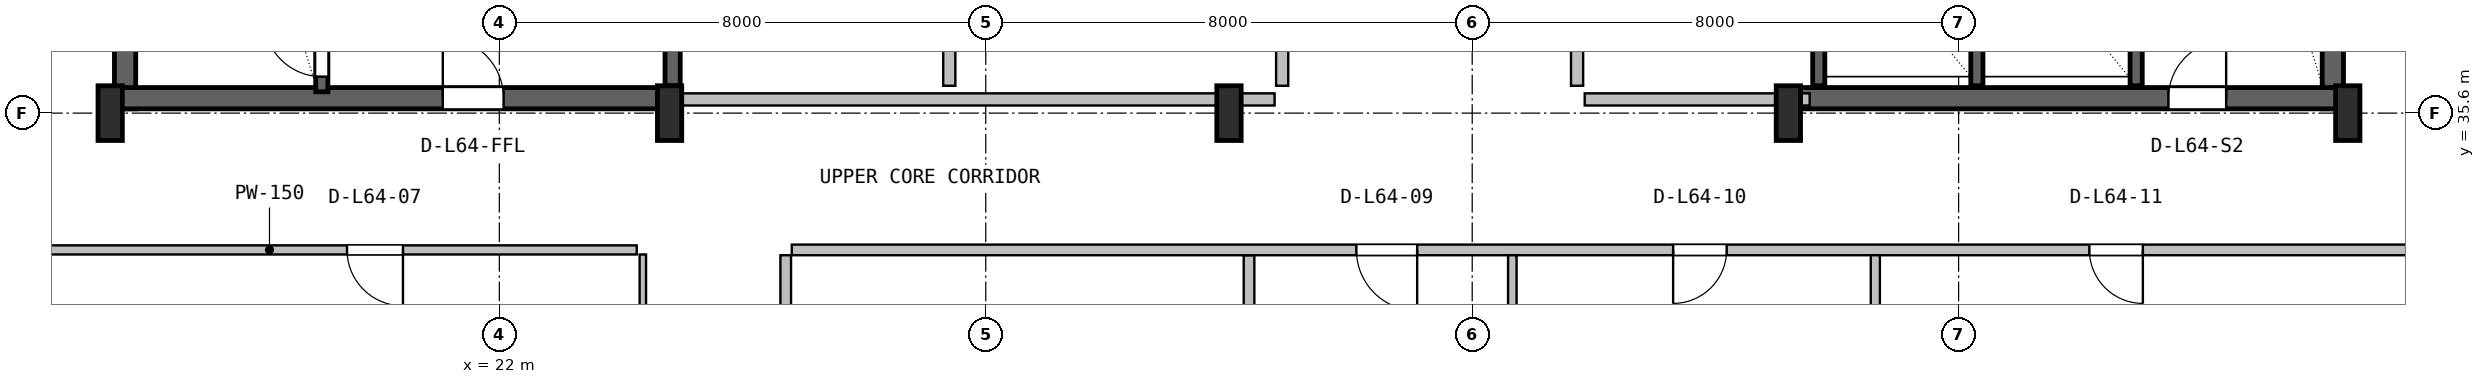
"""IFC4 building model, lengths in metres.
Left out: names, types, materials, properties, quantities, classifications, styles, units other than length and angle.
Written with IfcOpenShell. Run it as: python <this file> out.ifc"""

import sys

from ifc_helpers import new_model, si_unit, direction, frame, frame_2d, origin, origin_2d, place, context, subcontext, project, spatial, rectangle, i_section, extrude, source, transform, mapped, element, fill, save


model = new_model("IFC4")
c1 = context("Model", 3, precision=1e-05, world=origin(), true_north=direction((0.0, 1.0)))
c2 = subcontext(c1, "Body", "Model", "MODEL_VIEW")
j1 = project(units=[si_unit("LENGTHUNIT", "METRE"), si_unit("PLANEANGLEUNIT", "RADIAN")], contexts=[c1])
p1 = place(None, origin())
s1 = spatial("IfcSite", under=j1, at=p1, CompositionType="ELEMENT")
p2 = place(p1, origin())
s2 = spatial("IfcBuilding", under=s1, at=p2, CompositionType="ELEMENT")
p3 = place(p2, frame((0.0, 0.0, 258.4)))
s3 = spatial("IfcBuildingStorey", under=s2, at=p3, CompositionType="ELEMENT", Elevation=258.4)
for number, where, z_axis, x_axis in (
    (1, (15.845, 35.67, 0.0), (0.0, 0.0, 1.0), (0.0, 1.0, 0.0)),
    (2, (52.155, 35.67, 0.0), (0.0, 0.0, 1.0), (0.0, 1.0, 0.0)),
):
    element("IfcWall", number, at=place(p3, frame(where, z_axis=z_axis, x_axis=x_axis)), inside=s3, PredefinedType="SHEAR", context=c2, shape_type="SweptSolid", body=[
        extrude(rectangle(XDim=11.13, YDim=0.35, at=frame_2d((5.565, 0.0))), origin(), (0.0, 0.0, 1.0), 3.55),
    ])
p4 = place(p3, frame((15.67, 35.845, 0.0), z_axis=(0.0, 0.0, 1.0), x_axis=(1.0, 0.0, 0.0)))
e3 = element("IfcWall", 3, at=p4, inside=s3, PredefinedType="SHEAR", context=c2, shape_type="SweptSolid", body=[
    extrude(rectangle(XDim=9.13, YDim=0.35, at=frame_2d((4.565, 0.0))), origin(), (0.0, 0.0, 1.0), 3.55),
])
p5 = place(p4, frame((5.4, 0.0, 0.0)))
e4 = element("IfcOpeningElement", 4, at=p5, cuts=e3, PredefinedType="OPENING", context=c2, shape_type="SweptSolid", body=[
    extrude(rectangle(XDim=1.0, YDim=2.1, at=frame_2d((0.5, 1.05))), frame((0.0, 0.185, 0.0), z_axis=(0.0, -1.0, 0.0), x_axis=(1.0, 0.0, 0.0)), (0.0, 0.0, 1.0), 0.37),
])
p6 = place(p3, frame((43.2, 35.845, 0.0), z_axis=(0.0, 0.0, 1.0), x_axis=(1.0, 0.0, 0.0)))
e5 = element("IfcWall", 5, at=p6, inside=s3, PredefinedType="SHEAR", context=c2, shape_type="SweptSolid", body=[
    extrude(rectangle(XDim=9.13, YDim=0.35, at=frame_2d((4.565, 0.0))), origin(), (0.0, 0.0, 1.0), 3.55),
])
p7 = place(p6, frame((6.25, 0.0, 0.0)))
e6 = element("IfcOpeningElement", 6, at=p7, cuts=e5, PredefinedType="OPENING", context=c2, shape_type="SweptSolid", body=[
    extrude(rectangle(XDim=0.95, YDim=2.1, at=frame_2d((0.475, 1.05))), frame((0.0, 0.185, 0.0), z_axis=(0.0, -1.0, 0.0), x_axis=(1.0, 0.0, 0.0)), (0.0, 0.0, 1.0), 0.37),
])
m1 = source(origin(), c2, "Body", "SweptSolid", [
    extrude(i_section(OverallWidth=0.4, OverallDepth=0.9, WebThickness=0.016, FlangeThickness=0.028, FilletRadius=0.016, at=origin_2d()), origin(), (0.0, 0.0, 1.0), 3.8),
])
for number, where, z_axis, x_axis in (
    (7, (15.6, 35.6, 0.0), (0.0, 0.0, 1.0), (1.0, 0.0, 0.0)),
    (8, (24.8, 35.6, 0.0), (0.0, 0.0, 1.0), (1.0, 0.0, 0.0)),
    (9, (34.0, 35.6, 0.0), (0.0, 0.0, 1.0), (1.0, 0.0, 0.0)),
    (10, (43.2, 35.6, 0.0), (0.0, 0.0, 1.0), (1.0, 0.0, 0.0)),
    (11, (52.4, 35.6, 0.0), (0.0, 0.0, 1.0), (1.0, 0.0, 0.0)),
):
    element("IfcColumn", number, at=place(p3, frame(where, z_axis=z_axis, x_axis=x_axis)), inside=s3, PredefinedType="COLUMN", context=c2, shape_type="MappedRepresentation", body=[
        mapped(m1, transform((0.0, 0.0, 0.0), x_axis=(1.0, 0.0, 0.0), y_axis=(0.0, 1.0, 0.0), z_axis=(0.0, 0.0, 1.0), scale=1.0)),
    ])
p8 = place(p3, frame((19.08, 35.95, 0.0), z_axis=(0.0, 0.0, 1.0), x_axis=(0.0, 1.0, 0.0)))
e12 = element("IfcWall", 12, at=p8, inside=s3, PredefinedType="SHEAR", context=c2, shape_type="SweptSolid", body=[
    extrude(rectangle(XDim=9.65, YDim=0.2, at=frame_2d((4.825, 0.0))), origin(), (0.0, 0.0, 1.0), 3.55),
])
p9 = place(p8, frame((0.25, 0.0, 0.0)))
e13 = element("IfcOpeningElement", 13, at=p9, cuts=e12, PredefinedType="OPENING", context=c2, shape_type="SweptSolid", body=[
    extrude(rectangle(XDim=0.95, YDim=2.1, at=frame_2d((0.475, 1.05))), frame((0.0, 0.11, 0.0), z_axis=(0.0, -1.0, 0.0), x_axis=(1.0, 0.0, 0.0)), (0.0, 0.0, 1.0), 0.22),
])
p10 = place(p3, frame((24.85, 36.05, 0.0), z_axis=(0.0, 0.0, 1.0), x_axis=(0.0, 1.0, 0.0)))
e14 = element("IfcWall", 14, at=p10, inside=s3, PredefinedType="SHEAR", context=c2, shape_type="SweptSolid", body=[
    extrude(rectangle(XDim=10.45, YDim=0.25, at=frame_2d((5.225, 0.0))), origin(), (0.0, 0.0, 1.0), 3.55),
])
p11 = place(p3, frame((48.92, 36.05, 0.0), z_axis=(0.0, 0.0, 1.0), x_axis=(0.0, 1.0, 0.0)))
e15 = element("IfcWall", 15, at=p11, inside=s3, PredefinedType="SHEAR", context=c2, shape_type="SweptSolid", body=[
    extrude(rectangle(XDim=10.5, YDim=0.2, at=frame_2d((5.25, 0.0))), origin(), (0.0, 0.0, 1.0), 3.55),
])
for number, where, z_axis, x_axis in (
    (16, (43.7, 36.05, 0.0), (0.0, 0.0, 1.0), (0.0, 1.0, 0.0)),
    (17, (46.3, 36.05, 0.0), (0.0, 0.0, 1.0), (0.0, 1.0, 0.0)),
):
    element("IfcWall", number, at=place(p3, frame(where, z_axis=z_axis, x_axis=x_axis)), inside=s3, PredefinedType="SHEAR", context=c2, shape_type="SweptSolid", body=[
        extrude(rectangle(XDim=3.05, YDim=0.2, at=frame_2d((1.525, 0.0))), origin(), (0.0, 0.0, 1.0), 3.55),
    ])
p12 = place(p3, frame((25.0, 35.825, 0.0), z_axis=(0.0, 0.0, 1.0), x_axis=(1.0, 0.0, 0.0)))
e18 = element("IfcWall", 18, at=p12, inside=s3, PredefinedType="PLUMBINGWALL", context=c2, shape_type="SweptSolid", body=[
    extrude(rectangle(XDim=9.75, YDim=0.2, at=frame_2d((4.875, 0.0))), origin(), (0.0, 0.0, 1.0), 2.575),
])
for number, where, z_axis, x_axis in (
    (19, (29.4, 36.05, 0.0), (0.0, 0.0, 1.0), (0.0, 1.0, 0.0)),
    (20, (34.875, 36.05, 0.0), (0.0, 0.0, 1.0), (0.0, 1.0, 0.0)),
):
    element("IfcWall", number, at=place(p3, frame(where, z_axis=z_axis, x_axis=x_axis)), inside=s3, PredefinedType="PLUMBINGWALL", context=c2, shape_type="SweptSolid", body=[
        extrude(rectangle(XDim=3.1, YDim=0.2, at=frame_2d((1.55, 0.0))), origin(), (0.0, 0.0, 1.0), 3.53),
    ])
p13 = place(p3, frame((39.85, 35.825, 0.0), z_axis=(0.0, 0.0, 1.0), x_axis=(1.0, 0.0, 0.0)))
e21 = element("IfcWall", 21, at=p13, inside=s3, PredefinedType="SOLIDWALL", context=c2, shape_type="SweptSolid", body=[
    extrude(rectangle(XDim=3.7, YDim=0.2, at=frame_2d((1.85, 0.0))), origin(), (0.0, 0.0, 1.0), 2.575),
])
p14 = place(p3, frame((39.725, 36.05, 0.0), z_axis=(0.0, 0.0, 1.0), x_axis=(0.0, 1.0, 0.0)))
e22 = element("IfcWall", 22, at=p14, inside=s3, PredefinedType="SOLIDWALL", context=c2, shape_type="SweptSolid", body=[
    extrude(rectangle(XDim=3.1, YDim=0.2, at=frame_2d((1.55, 0.0))), origin(), (0.0, 0.0, 1.0), 3.53),
])
p15 = place(p3, frame((24.36, 23.162, 0.0), z_axis=(0.0, 0.0, 1.0), x_axis=(0.0, 1.0, 0.0)))
e23 = element("IfcWall", 23, at=p15, inside=s3, PredefinedType="PARTITIONING", context=c2, shape_type="SweptSolid", body=[
    extrude(rectangle(XDim=10.113, YDim=0.105, at=frame_2d((5.056, 0.0))), origin(), (0.0, 0.0, 1.0), 3.278),
])
p16 = place(p3, frame((12.18, 33.35, 0.0), z_axis=(0.0, 0.0, 1.0), x_axis=(1.0, 0.0, 0.0)))
e24 = element("IfcWall", 24, at=p16, inside=s3, PredefinedType="PARTITIONING", context=c2, shape_type="SweptSolid", body=[
    extrude(rectangle(XDim=12.08, YDim=0.15, at=frame_2d((6.04, 0.0))), origin(), (0.0, 0.0, 1.0), 3.171),
])
p17 = place(p16, frame((7.315, 0.0, 0.0)))
e25 = element("IfcOpeningElement", 25, at=p17, cuts=e24, PredefinedType="OPENING", context=c2, shape_type="SweptSolid", body=[
    extrude(rectangle(XDim=0.92, YDim=2.08, at=frame_2d((0.46, 1.04))), frame((0.0, 0.085, 0.0), z_axis=(0.0, -1.0, 0.0), x_axis=(1.0, 0.0, 0.0)), (0.0, 0.0, 1.0), 0.17),
])
p18 = place(p3, frame((34.33, 13.38, 0.0), z_axis=(0.0, 0.0, 1.0), x_axis=(0.0, 1.0, 0.0)))
e26 = element("IfcWall", 26, at=p18, inside=s3, PredefinedType="PARTITIONING", context=c2, shape_type="SweptSolid", body=[
    extrude(rectangle(XDim=19.883, YDim=0.175, at=frame_2d((9.941, 0.0))), origin(), (0.0, 0.0, 1.0), 2.981),
])
p19 = place(p3, frame((26.81, 33.35, 0.0), z_axis=(0.0, 0.0, 1.0), x_axis=(1.0, 0.0, 0.0)))
e27 = element("IfcWall", 27, at=p19, inside=s3, PredefinedType="PARTITIONING", context=c2, shape_type="SweptSolid", body=[
    extrude(rectangle(XDim=29.01, YDim=0.175, at=frame_2d((14.505, 0.0))), origin(), (0.0, 0.0, 1.0), 2.981),
])
p20 = place(p19, frame((9.285, 0.0, 0.0)))
e28 = element("IfcOpeningElement", 28, at=p20, cuts=e27, PredefinedType="OPENING", context=c2, shape_type="SweptSolid", body=[
    extrude(rectangle(XDim=1.0, YDim=2.1, at=frame_2d((0.5, 1.05))), frame((0.0, 0.098, 0.0), z_axis=(0.0, -1.0, 0.0), x_axis=(1.0, 0.0, 0.0)), (0.0, 0.0, 1.0), 0.195),
])
p21 = place(p19, frame((14.495, 0.0, 0.0)))
e29 = element("IfcOpeningElement", 29, at=p21, cuts=e27, PredefinedType="OPENING", context=c2, shape_type="SweptSolid", body=[
    extrude(rectangle(XDim=0.88, YDim=2.06, at=frame_2d((0.44, 1.03))), frame((0.0, 0.098, 0.0), z_axis=(0.0, -1.0, 0.0), x_axis=(1.0, 0.0, 0.0)), (0.0, 0.0, 1.0), 0.195),
])
p22 = place(p19, frame((21.34, 0.0, 0.0)))
e30 = element("IfcOpeningElement", 30, at=p22, cuts=e27, PredefinedType="OPENING", context=c2, shape_type="SweptSolid", body=[
    extrude(rectangle(XDim=0.88, YDim=2.06, at=frame_2d((0.44, 1.03))), frame((0.0, 0.098, 0.0), z_axis=(0.0, -1.0, 0.0), x_axis=(1.0, 0.0, 0.0)), (0.0, 0.0, 1.0), 0.195),
])
p23 = place(p3, frame((26.71, 13.38, 0.0), z_axis=(0.0, 0.0, 1.0), x_axis=(0.0, 1.0, 0.0)))
e31 = element("IfcWall", 31, at=p23, inside=s3, PredefinedType="PARTITIONING", context=c2, shape_type="SweptSolid", body=[
    extrude(rectangle(XDim=19.883, YDim=0.175, at=frame_2d((9.941, 0.0))), origin(), (0.0, 0.0, 1.0), 2.981),
])
p24 = place(p23, frame((9.865, 0.0, 0.0)))
e32 = element("IfcOpeningElement", 32, at=p24, cuts=e31, PredefinedType="OPENING", context=c2, shape_type="SweptSolid", body=[
    extrude(rectangle(XDim=1.05, YDim=2.1, at=frame_2d((0.525, 1.05))), frame((0.0, 0.098, 0.0), z_axis=(0.0, -1.0, 0.0), x_axis=(1.0, 0.0, 0.0)), (0.0, 0.0, 1.0), 0.195),
])
p25 = place(p3, frame((38.66, 13.38, 0.0), z_axis=(0.0, 0.0, 1.0), x_axis=(0.0, 1.0, 0.0)))
e33 = element("IfcWall", 33, at=p25, inside=s3, PredefinedType="PARTITIONING", context=c2, shape_type="SweptSolid", body=[
    extrude(rectangle(XDim=19.883, YDim=0.14, at=frame_2d((9.941, 0.0))), origin(), (0.0, 0.0, 1.0), 2.981),
])
p26 = place(p3, frame((44.63, 13.38, 0.0), z_axis=(0.0, 0.0, 1.0), x_axis=(0.0, 1.0, 0.0)))
e34 = element("IfcWall", 34, at=p26, inside=s3, PredefinedType="PARTITIONING", context=c2, shape_type="SweptSolid", body=[
    extrude(rectangle(XDim=19.883, YDim=0.15, at=frame_2d((9.941, 0.0))), origin(), (0.0, 0.0, 1.0), 3.171),
])
m2 = source(origin(), c2, "Body", "SweptSolid", [
    extrude(rectangle(XDim=0.95, YDim=2.1, at=frame_2d((0.475, 1.05))), frame((0.0, 0.025, 0.0), z_axis=(0.0, -1.0, 0.0), x_axis=(1.0, 0.0, 0.0)), (0.0, 0.0, 1.0), 0.05),
])
p27 = place(p9, origin())
e35 = element("IfcDoor", 35, at=p27, inside=s3, OperationType="SINGLE_SWING_RIGHT", PredefinedType="DOOR", context=c2, shape_type="MappedRepresentation", body=[
    mapped(m2, transform((0.0, 0.0, 0.0), x_axis=(1.0, 0.0, 0.0), y_axis=(0.0, 1.0, 0.0), z_axis=(0.0, 0.0, 1.0), scale=1.0)),
])
fill(e13, e35)
m3 = source(origin(), c2, "Body", "SweptSolid", [
    extrude(rectangle(XDim=1.0, YDim=2.1, at=frame_2d((0.5, 1.05))), frame((0.0, 0.025, 0.0), z_axis=(0.0, -1.0, 0.0), x_axis=(1.0, 0.0, 0.0)), (0.0, 0.0, 1.0), 0.05),
])
p28 = place(p5, origin())
e36 = element("IfcDoor", 36, at=p28, inside=s3, OperationType="SINGLE_SWING_LEFT", PredefinedType="DOOR", context=c2, shape_type="MappedRepresentation", body=[
    mapped(m3, transform((0.0, 0.0, 0.0), x_axis=(1.0, 0.0, 0.0), y_axis=(0.0, 1.0, 0.0), z_axis=(0.0, 0.0, 1.0), scale=1.0)),
])
fill(e4, e36)
p29 = place(p7, origin())
e37 = element("IfcDoor", 37, at=p29, inside=s3, OperationType="SINGLE_SWING_RIGHT", PredefinedType="DOOR", context=c2, shape_type="MappedRepresentation", body=[
    mapped(m2, transform((0.0, 0.0, 0.0), x_axis=(1.0, 0.0, 0.0), y_axis=(0.0, 1.0, 0.0), z_axis=(0.0, 0.0, 1.0), scale=1.0)),
])
fill(e6, e37)
m4 = source(origin(), c2, "Body", "SweptSolid", [
    extrude(rectangle(XDim=0.92, YDim=2.08, at=frame_2d((0.46, 1.04))), frame((0.0, 0.025, 0.0), z_axis=(0.0, -1.0, 0.0), x_axis=(1.0, 0.0, 0.0)), (0.0, 0.0, 1.0), 0.05),
])
p30 = place(p17, frame((0.92, 0.0, 0.0), z_axis=(0.0, 0.0, 1.0), x_axis=(-1.0, 0.0, 0.0)))
e38 = element("IfcDoor", 38, at=p30, inside=s3, OperationType="SINGLE_SWING_RIGHT", PredefinedType="DOOR", context=c2, shape_type="MappedRepresentation", body=[
    mapped(m4, transform((0.0, 0.0, 0.0), x_axis=(1.0, 0.0, 0.0), y_axis=(0.0, 1.0, 0.0), z_axis=(0.0, 0.0, 1.0), scale=1.0)),
])
fill(e25, e38)
m5 = source(origin(), c2, "Body", "SweptSolid", [
    extrude(rectangle(XDim=1.0, YDim=2.1, at=frame_2d((0.5, 1.05))), frame((0.0, 0.025, 0.0), z_axis=(0.0, -1.0, 0.0), x_axis=(1.0, 0.0, 0.0)), (0.0, 0.0, 1.0), 0.05),
])
p31 = place(p20, frame((1.0, 0.0, 0.0), z_axis=(0.0, 0.0, 1.0), x_axis=(-1.0, 0.0, 0.0)))
e39 = element("IfcDoor", 39, at=p31, inside=s3, OperationType="SINGLE_SWING_RIGHT", PredefinedType="DOOR", context=c2, shape_type="MappedRepresentation", body=[
    mapped(m5, transform((0.0, 0.0, 0.0), x_axis=(1.0, 0.0, 0.0), y_axis=(0.0, 1.0, 0.0), z_axis=(0.0, 0.0, 1.0), scale=1.0)),
])
fill(e28, e39)
m6 = source(origin(), c2, "Body", "SweptSolid", [
    extrude(rectangle(XDim=0.88, YDim=2.06, at=frame_2d((0.44, 1.03))), frame((0.0, 0.025, 0.0), z_axis=(0.0, -1.0, 0.0), x_axis=(1.0, 0.0, 0.0)), (0.0, 0.0, 1.0), 0.05),
])
p32 = place(p21, frame((0.88, 0.0, 0.0), z_axis=(0.0, 0.0, 1.0), x_axis=(-1.0, 0.0, 0.0)))
e40 = element("IfcDoor", 40, at=p32, inside=s3, OperationType="SINGLE_SWING_LEFT", PredefinedType="DOOR", context=c2, shape_type="MappedRepresentation", body=[
    mapped(m6, transform((0.0, 0.0, 0.0), x_axis=(1.0, 0.0, 0.0), y_axis=(0.0, 1.0, 0.0), z_axis=(0.0, 0.0, 1.0), scale=1.0)),
])
fill(e29, e40)
p33 = place(p22, frame((0.88, 0.0, 0.0), z_axis=(0.0, 0.0, 1.0), x_axis=(-1.0, 0.0, 0.0)))
e41 = element("IfcDoor", 41, at=p33, inside=s3, OperationType="SINGLE_SWING_RIGHT", PredefinedType="DOOR", context=c2, shape_type="MappedRepresentation", body=[
    mapped(m6, transform((0.0, 0.0, 0.0), x_axis=(1.0, 0.0, 0.0), y_axis=(0.0, 1.0, 0.0), z_axis=(0.0, 0.0, 1.0), scale=1.0)),
])
fill(e30, e41)
save(model, sys.argv[1])
